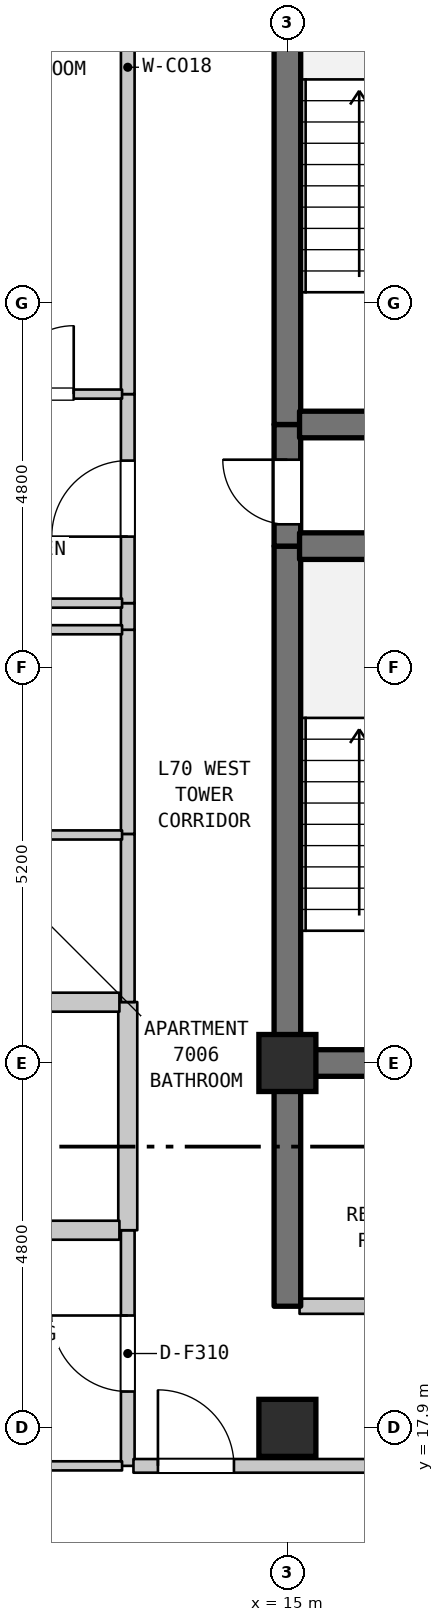
"""IFC4 building model, lengths in metres.
Left out: names, types, materials, properties, quantities, classifications, styles, units other than length and angle.
Written with IfcOpenShell. Run it as: python <this file> out.ifc"""

import sys

from ifc_helpers import new_model, si_unit, direction, frame, frame_2d, origin, origin_2d, place, context, subcontext, project, spatial, rectangle, extrude, element, fill, save


model = new_model("IFC4")
c1 = context("Model", 3, precision=1e-05, world=origin(), true_north=direction((0.0, 1.0)))
c2 = subcontext(c1, "Body", "Model", "MODEL_VIEW")
j1 = project(units=[si_unit("LENGTHUNIT", "METRE"), si_unit("PLANEANGLEUNIT", "RADIAN")], contexts=[c1])
p1 = place(None, origin())
s1 = spatial("IfcSite", under=j1, at=p1, CompositionType="ELEMENT")
p2 = place(p1, origin())
s2 = spatial("IfcBuilding", under=s1, at=p2, CompositionType="ELEMENT")
p3 = place(p2, frame((0.0, 0.0, 280.6)))
s3 = spatial("IfcBuildingStorey", under=s2, at=p3, CompositionType="ELEMENT", Elevation=280.6)
for number, where, z_axis, x_axis in (
    (1, (15.0, 17.9, 0.0), (0.0, 0.0, 1.0), (1.0, 0.0, 0.0)),
    (2, (15.0, 22.7, 0.0), (0.0, 0.0, 1.0), (1.0, 0.0, 0.0)),
):
    element("IfcColumn", number, at=place(p3, frame(where, z_axis=z_axis, x_axis=x_axis)), inside=s3, PredefinedType="COLUMN", context=c2, shape_type="SweptSolid", body=[
        extrude(rectangle(XDim=0.75, YDim=0.75, at=origin_2d()), origin(), (0.0, 0.0, 1.0), 3.7),
    ])
p4 = place(p3, frame((12.9, 17.4, 0.0), z_axis=(0.0, 0.0, 1.0), x_axis=(0.0, 1.0, 0.0)))
e3 = element("IfcWall", 3, at=p4, inside=s3, PredefinedType="STANDARD", context=c2, shape_type="SweptSolid", body=[
    extrude(rectangle(XDim=3.1, YDim=0.18, at=frame_2d((1.55, 0.0))), origin(), (0.0, 0.0, 1.0), 3.39),
])
p5 = place(p4, frame((0.978, 0.0, 0.0)))
e4 = element("IfcOpeningElement", 4, at=p5, cuts=e3, PredefinedType="OPENING", context=c2, shape_type="SweptSolid", body=[
    extrude(rectangle(XDim=1.0, YDim=2.15, at=frame_2d((0.5, 1.075))), frame((0.0, 0.1, 0.0), z_axis=(0.0, -1.0, 0.0), x_axis=(1.0, 0.0, 0.0)), (0.0, 0.0, 1.0), 0.2),
])
p6 = place(p3, frame((12.9, 20.5, 0.0), z_axis=(0.0, 0.0, 1.0), x_axis=(0.0, 1.0, 0.0)))
e5 = element("IfcWall", 5, at=p6, inside=s3, PredefinedType="STANDARD", context=c2, shape_type="SweptSolid", body=[
    extrude(rectangle(XDim=3.002, YDim=0.25, at=frame_2d((1.501, 0.0))), origin(), (0.0, 0.0, 1.0), 3.39),
])
p7 = place(p3, frame((12.9, 23.502, 0.0), z_axis=(0.0, 0.0, 1.0), x_axis=(0.0, 1.0, 0.0)))
e6 = element("IfcWall", 6, at=p7, inside=s3, PredefinedType="STANDARD", context=c2, shape_type="SweptSolid", body=[
    extrude(rectangle(XDim=2.212, YDim=0.18, at=frame_2d((1.106, 0.0))), origin(), (0.0, 0.0, 1.0), 3.39),
])
p8 = place(p3, frame((12.9, 25.714, 0.0), z_axis=(0.0, 0.0, 1.0), x_axis=(0.0, 1.0, 0.0)))
e7 = element("IfcWall", 7, at=p8, inside=s3, PredefinedType="STANDARD", context=c2, shape_type="SweptSolid", body=[
    extrude(rectangle(XDim=2.686, YDim=0.18, at=frame_2d((1.343, 0.0))), origin(), (0.0, 0.0, 1.0), 3.39),
])
p9 = place(p3, frame((12.9, 28.4, 0.0), z_axis=(0.0, 0.0, 1.0), x_axis=(0.0, 1.0, 0.0)))
e8 = element("IfcWall", 8, at=p9, inside=s3, PredefinedType="STANDARD", context=c2, shape_type="SweptSolid", body=[
    extrude(rectangle(XDim=0.35, YDim=0.18, at=frame_2d((0.175, 0.0))), origin(), (0.0, 0.0, 1.0), 3.39),
])
p10 = place(p3, frame((12.9, 28.75, 0.0), z_axis=(0.0, 0.0, 1.0), x_axis=(0.0, 1.0, 0.0)))
e9 = element("IfcWall", 9, at=p10, inside=s3, PredefinedType="STANDARD", context=c2, shape_type="SweptSolid", body=[
    extrude(rectangle(XDim=2.75, YDim=0.18, at=frame_2d((1.375, 0.0))), origin(), (0.0, 0.0, 1.0), 3.39),
])
p11 = place(p10, frame((0.875, 0.0, 0.0)))
e10 = element("IfcOpeningElement", 10, at=p11, cuts=e9, PredefinedType="OPENING", context=c2, shape_type="SweptSolid", body=[
    extrude(rectangle(XDim=1.0, YDim=2.15, at=frame_2d((0.5, 1.075))), frame((0.0, 0.1, 0.0), z_axis=(0.0, -1.0, 0.0), x_axis=(1.0, 0.0, 0.0)), (0.0, 0.0, 1.0), 0.2),
])
p12 = place(p3, frame((12.9, 31.5, 0.0), z_axis=(0.0, 0.0, 1.0), x_axis=(0.0, 1.0, 0.0)))
e11 = element("IfcWall", 11, at=p12, inside=s3, PredefinedType="STANDARD", context=c2, shape_type="SweptSolid", body=[
    extrude(rectangle(XDim=8.6, YDim=0.18, at=frame_2d((4.3, 0.0))), origin(), (0.0, 0.0, 1.0), 3.39),
])
p13 = place(p3, frame((15.0, 19.5, 0.0), z_axis=(0.0, 0.0, 1.0), x_axis=(0.0, 1.0, 0.0)))
e12 = element("IfcWall", 12, at=p13, inside=s3, PredefinedType="SHEAR", context=c2, shape_type="SweptSolid", body=[
    extrude(rectangle(XDim=3.2, YDim=0.35, at=frame_2d((1.6, 0.0))), origin(), (0.0, 0.0, 1.0), 3.39),
])
p14 = place(p3, frame((15.0, 22.7, 0.0), z_axis=(0.0, 0.0, 1.0), x_axis=(0.0, 1.0, 0.0)))
e13 = element("IfcWall", 13, at=p14, inside=s3, PredefinedType="SHEAR", context=c2, shape_type="SweptSolid", body=[
    extrude(rectangle(XDim=6.8, YDim=0.35, at=frame_2d((3.4, 0.0))), origin(), (0.0, 0.0, 1.0), 3.39),
])
p15 = place(p3, frame((15.0, 29.5, 0.0), z_axis=(0.0, 0.0, 1.0), x_axis=(0.0, 1.0, 0.0)))
e14 = element("IfcWall", 14, at=p15, inside=s3, PredefinedType="SHEAR", context=c2, shape_type="SweptSolid", body=[
    extrude(rectangle(XDim=1.6, YDim=0.35, at=frame_2d((0.8, 0.0))), origin(), (0.0, 0.0, 1.0), 3.39),
])
p16 = place(p15, frame((0.287, 0.0, 0.0)))
e15 = element("IfcOpeningElement", 15, at=p16, cuts=e14, PredefinedType="OPENING", context=c2, shape_type="SweptSolid", body=[
    extrude(rectangle(XDim=0.85, YDim=2.1, at=frame_2d((0.425, 1.05))), frame((0.0, 0.185, 0.0), z_axis=(0.0, -1.0, 0.0), x_axis=(1.0, 0.0, 0.0)), (0.0, 0.0, 1.0), 0.37),
])
p17 = place(p3, frame((15.0, 31.1, 0.0), z_axis=(0.0, 0.0, 1.0), x_axis=(0.0, 1.0, 0.0)))
e16 = element("IfcWall", 16, at=p17, inside=s3, PredefinedType="SHEAR", context=c2, shape_type="SweptSolid", body=[
    extrude(rectangle(XDim=6.8, YDim=0.35, at=frame_2d((3.4, 0.0))), origin(), (0.0, 0.0, 1.0), 3.39),
])
p18 = place(p3, frame((8.973, 17.4, 0.0), z_axis=(0.0, 0.0, 1.0), x_axis=(1.0, 0.0, 0.0)))
e17 = element("IfcWall", 17, at=p18, inside=s3, PredefinedType="PARTITIONING", context=c2, shape_type="SweptSolid", body=[
    extrude(rectangle(XDim=3.852, YDim=0.12, at=frame_2d((1.926, 0.0))), origin(), (0.0, 0.0, 1.0), 3.39),
])
p19 = place(p3, frame((12.975, 17.4, 0.0), z_axis=(0.0, 0.0, 1.0), x_axis=(1.0, 0.0, 0.0)))
e18 = element("IfcWall", 18, at=p19, inside=s3, PredefinedType="STANDARD", context=c2, shape_type="SweptSolid", body=[
    extrude(rectangle(XDim=3.68, YDim=0.18, at=frame_2d((1.84, 0.0))), origin(), (0.0, 0.0, 1.0), 3.39),
])
p20 = place(p19, frame((0.322, 0.0, 0.0)))
e19 = element("IfcOpeningElement", 19, at=p20, cuts=e18, PredefinedType="OPENING", context=c2, shape_type="SweptSolid", body=[
    extrude(rectangle(XDim=1.0, YDim=2.15, at=frame_2d((0.5, 1.075))), frame((0.0, 0.1, 0.0), z_axis=(0.0, -1.0, 0.0), x_axis=(1.0, 0.0, 0.0)), (0.0, 0.0, 1.0), 0.2),
])
p21 = place(p3, frame((15.16, 19.5, 0.0), z_axis=(0.0, 0.0, 1.0), x_axis=(1.0, 0.0, 0.0)))
e20 = element("IfcWall", 20, at=p21, inside=s3, PredefinedType="STANDARD", context=c2, shape_type="SweptSolid", body=[
    extrude(rectangle(XDim=3.68, YDim=0.2, at=frame_2d((1.84, 0.0))), origin(), (0.0, 0.0, 1.0), 3.39),
])
p22 = place(p21, frame((1.39, 0.0, 0.0)))
e21 = element("IfcOpeningElement", 21, at=p22, cuts=e20, PredefinedType="OPENING", context=c2, shape_type="SweptSolid", body=[
    extrude(rectangle(XDim=0.9, YDim=2.15, at=frame_2d((0.45, 1.075))), frame((0.0, 0.11, 0.0), z_axis=(0.0, -1.0, 0.0), x_axis=(1.0, 0.0, 0.0)), (0.0, 0.0, 1.0), 0.22),
])
p23 = place(p3, frame((10.76, 20.5, 0.0), z_axis=(0.0, 0.0, 1.0), x_axis=(1.0, 0.0, 0.0)))
e22 = element("IfcWall", 22, at=p23, inside=s3, PredefinedType="STANDARD", context=c2, shape_type="SweptSolid", body=[
    extrude(rectangle(XDim=2.03, YDim=0.25, at=frame_2d((1.015, 0.0))), origin(), (0.0, 0.0, 1.0), 3.39),
])
p24 = place(p3, frame((15.16, 22.7, 0.0), z_axis=(0.0, 0.0, 1.0), x_axis=(1.0, 0.0, 0.0)))
e23 = element("IfcWall", 23, at=p24, inside=s3, PredefinedType="SHEAR", context=c2, shape_type="SweptSolid", body=[
    extrude(rectangle(XDim=3.68, YDim=0.35, at=frame_2d((1.84, 0.0))), origin(), (0.0, 0.0, 1.0), 3.39),
])
p25 = place(p3, frame((10.76, 23.5, 0.0), z_axis=(0.0, 0.0, 1.0), x_axis=(1.0, 0.0, 0.0)))
e24 = element("IfcWall", 24, at=p25, inside=s3, PredefinedType="STANDARD", context=c2, shape_type="SweptSolid", body=[
    extrude(rectangle(XDim=2.03, YDim=0.25, at=frame_2d((1.015, 0.0))), origin(), (0.0, 0.0, 1.0), 3.39),
])
for number, where, z_axis, x_axis in (
    (25, (10.695, 25.7, 0.0), (0.0, 0.0, 1.0), (1.0, 0.0, 0.0)),
    (26, (10.695, 28.4, 0.0), (0.0, 0.0, 1.0), (1.0, 0.0, 0.0)),
):
    element("IfcWall", number, at=place(p3, frame(where, z_axis=z_axis, x_axis=x_axis)), inside=s3, PredefinedType="PARTITIONING", context=c2, shape_type="SweptSolid", body=[
        extrude(rectangle(XDim=2.13, YDim=0.12, at=frame_2d((1.065, 0.0))), origin(), (0.0, 0.0, 1.0), 3.39),
    ])
p26 = place(p3, frame((9.175, 28.75, 0.0), z_axis=(0.0, 0.0, 1.0), x_axis=(1.0, 0.0, 0.0)))
e27 = element("IfcWall", 27, at=p26, inside=s3, PredefinedType="PARTITIONING", context=c2, shape_type="SweptSolid", body=[
    extrude(rectangle(XDim=3.65, YDim=0.12, at=frame_2d((1.825, 0.0))), origin(), (0.0, 0.0, 1.0), 3.39),
])
for number, where, z_axis, x_axis in (
    (28, (15.16, 29.5, 0.0), (0.0, 0.0, 1.0), (1.0, 0.0, 0.0)),
    (29, (15.16, 31.1, 0.0), (0.0, 0.0, 1.0), (1.0, 0.0, 0.0)),
):
    element("IfcWall", number, at=place(p3, frame(where, z_axis=z_axis, x_axis=x_axis)), inside=s3, PredefinedType="SHEAR", context=c2, shape_type="SweptSolid", body=[
        extrude(rectangle(XDim=3.68, YDim=0.35, at=frame_2d((1.84, 0.0))), origin(), (0.0, 0.0, 1.0), 3.39),
    ])
p27 = place(p3, frame((10.623, 31.5, 0.0), z_axis=(0.0, 0.0, 1.0), x_axis=(1.0, 0.0, 0.0)))
e30 = element("IfcWall", 30, at=p27, inside=s3, PredefinedType="PARTITIONING", context=c2, shape_type="SweptSolid", body=[
    extrude(rectangle(XDim=2.202, YDim=0.12, at=frame_2d((1.101, 0.0))), origin(), (0.0, 0.0, 1.0), 3.39),
])
p28 = place(p27, frame((0.666, 0.0, 0.0)))
e31 = element("IfcOpeningElement", 31, at=p28, cuts=e30, PredefinedType="OPENING", context=c2, shape_type="SweptSolid", body=[
    extrude(rectangle(XDim=0.9, YDim=2.1, at=frame_2d((0.45, 1.05))), frame((0.0, 0.07, 0.0), z_axis=(0.0, -1.0, 0.0), x_axis=(1.0, 0.0, 0.0)), (0.0, 0.0, 1.0), 0.14),
])
p29 = place(p5, origin())
e32 = element("IfcDoor", 32, at=p29, inside=s3, OperationType="SINGLE_SWING_RIGHT", PredefinedType="DOOR", context=c2, shape_type="SweptSolid", body=[
    extrude(rectangle(XDim=1.0, YDim=2.15, at=frame_2d((0.5, 1.075))), frame((0.0, 0.025, 0.0), z_axis=(0.0, -1.0, 0.0), x_axis=(1.0, 0.0, 0.0)), (0.0, 0.0, 1.0), 0.05),
])
fill(e4, e32)
p30 = place(p11, origin())
e33 = element("IfcDoor", 33, at=p30, inside=s3, OperationType="SINGLE_SWING_LEFT", PredefinedType="DOOR", context=c2, shape_type="SweptSolid", body=[
    extrude(rectangle(XDim=1.0, YDim=2.15, at=frame_2d((0.5, 1.075))), frame((0.0, 0.025, 0.0), z_axis=(0.0, -1.0, 0.0), x_axis=(1.0, 0.0, 0.0)), (0.0, 0.0, 1.0), 0.05),
])
fill(e10, e33)
p31 = place(p16, origin())
e34 = element("IfcDoor", 34, at=p31, inside=s3, OperationType="SINGLE_SWING_RIGHT", PredefinedType="DOOR", context=c2, shape_type="SweptSolid", body=[
    extrude(rectangle(XDim=0.85, YDim=2.1, at=frame_2d((0.425, 1.05))), frame((0.0, 0.025, 0.0), z_axis=(0.0, -1.0, 0.0), x_axis=(1.0, 0.0, 0.0)), (0.0, 0.0, 1.0), 0.05),
])
fill(e15, e34)
p32 = place(p20, origin())
e35 = element("IfcDoor", 35, at=p32, inside=s3, OperationType="SINGLE_SWING_LEFT", PredefinedType="DOOR", context=c2, shape_type="SweptSolid", body=[
    extrude(rectangle(XDim=1.0, YDim=2.15, at=frame_2d((0.5, 1.075))), frame((0.0, 0.025, 0.0), z_axis=(0.0, -1.0, 0.0), x_axis=(1.0, 0.0, 0.0)), (0.0, 0.0, 1.0), 0.05),
])
fill(e19, e35)
p33 = place(p28, origin())
e36 = element("IfcDoor", 36, at=p33, inside=s3, OperationType="SINGLE_SWING_RIGHT", PredefinedType="DOOR", context=c2, shape_type="SweptSolid", body=[
    extrude(rectangle(XDim=0.9, YDim=2.1, at=frame_2d((0.45, 1.05))), frame((0.0, 0.025, 0.0), z_axis=(0.0, -1.0, 0.0), x_axis=(1.0, 0.0, 0.0)), (0.0, 0.0, 1.0), 0.05),
])
fill(e31, e36)
save(model, sys.argv[1])
